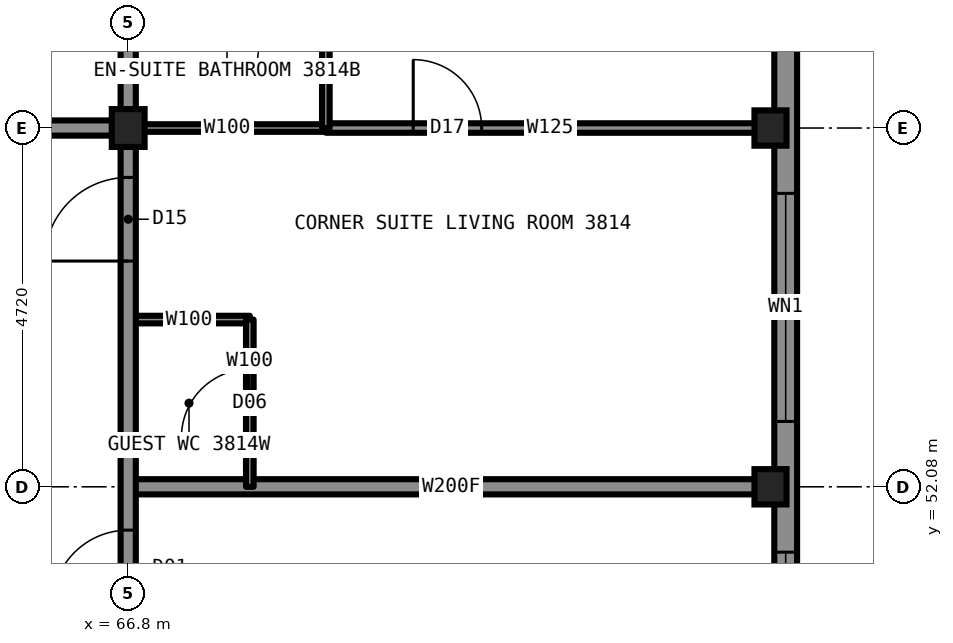
"""IFC4 building model, lengths in metres.
Left out: names, types, materials, properties, quantities, classifications, styles, units other than length and angle.
Written with IfcOpenShell. Run it as: python <this file> out.ifc"""

import sys

from ifc_helpers import new_model, si_unit, direction, frame, frame_2d, origin, origin_2d, place, context, subcontext, project, spatial, rectangle, i_section, extrude, element, fill, save


model = new_model("IFC4")
c1 = context("Model", 3, precision=1e-05, world=origin(), true_north=direction((0.0, 1.0)))
c2 = subcontext(c1, "Body", "Model", "MODEL_VIEW")
j1 = project(units=[si_unit("LENGTHUNIT", "METRE"), si_unit("PLANEANGLEUNIT", "RADIAN")], contexts=[c1])
p1 = place(None, origin())
s1 = spatial("IfcSite", under=j1, at=p1, CompositionType="ELEMENT")
p2 = place(p1, origin())
s2 = spatial("IfcBuilding", under=s1, at=p2, CompositionType="ELEMENT")
p3 = place(p2, frame((0.0, 0.0, 135.4)))
s3 = spatial("IfcBuildingStorey", under=s2, at=p3, CompositionType="ELEMENT", Elevation=135.4)
for number, where, z_axis, x_axis in (
    (1, (75.25, 52.08, 0.0), (0.0, 0.0, 1.0), (1.0, 0.0, 0.0)),
    (2, (75.25, 56.8, 0.0), (0.0, 0.0, 1.0), (1.0, 0.0, 0.0)),
):
    element("IfcColumn", number, at=place(p3, frame(where, z_axis=z_axis, x_axis=x_axis)), inside=s3, PredefinedType="COLUMN", context=c2, shape_type="SweptSolid", body=[
        extrude(i_section(OverallWidth=0.422, OverallDepth=0.465, WebThickness=0.045, FlangeThickness=0.073, at=origin_2d()), origin(), (0.0, 0.0, 1.0), 3.5),
    ])
p4 = place(p3, frame((66.8, 56.8, 0.0), z_axis=(0.0, 0.0, 1.0), x_axis=(1.0, 0.0, 0.0)))
e3 = element("IfcColumn", 3, at=p4, inside=s3, PredefinedType="COLUMN", context=c2, shape_type="SweptSolid", body=[
    extrude(i_section(OverallWidth=0.432, OverallDepth=0.498, WebThickness=0.056, FlangeThickness=0.089, at=origin_2d()), origin(), (0.0, 0.0, 1.0), 3.5),
])
p5 = place(p3, frame((66.8, 56.8, 0.0), z_axis=(0.0, 0.0, 1.0), x_axis=(1.0, 0.0, 0.0)))
e4 = element("IfcWall", 4, at=p5, inside=s3, PredefinedType="PARTITIONING", context=c2, shape_type="SweptSolid", body=[
    extrude(rectangle(XDim=2.6, YDim=0.1, at=frame_2d((1.3, 0.0))), origin(), (0.0, 0.0, 1.0), 2.573),
])
p6 = place(p3, frame((43.2, 56.8, 0.0), z_axis=(0.0, 0.0, 1.0), x_axis=(1.0, 0.0, 0.0)))
e5 = element("IfcWall", 5, at=p6, inside=s3, PredefinedType="PARTITIONING", context=c2, shape_type="SweptSolid", body=[
    extrude(rectangle(XDim=23.6, YDim=0.2, at=frame_2d((11.8, 0.0))), origin(), (0.0, 0.0, 1.0), 3.33),
])
p7 = place(p6, frame((1.85, 0.0, 0.0)))
e6 = element("IfcOpeningElement", 6, at=p7, cuts=e5, PredefinedType="OPENING", context=c2, shape_type="SweptSolid", body=[
    extrude(rectangle(XDim=1.1, YDim=2.2, at=frame_2d((0.55, 1.1))), frame((0.0, 0.11, 0.0), z_axis=(0.0, -1.0, 0.0), x_axis=(1.0, 0.0, 0.0)), (0.0, 0.0, 1.0), 0.22),
])
p8 = place(p6, frame((14.56, 0.0, 0.0)))
e7 = element("IfcOpeningElement", 7, at=p8, cuts=e5, PredefinedType="OPENING", context=c2, shape_type="SweptSolid", body=[
    extrude(rectangle(XDim=1.0, YDim=2.2, at=frame_2d((0.5, 1.1))), frame((0.0, 0.11, 0.0), z_axis=(0.0, -1.0, 0.0), x_axis=(1.0, 0.0, 0.0)), (0.0, 0.0, 1.0), 0.22),
])
p9 = place(p6, frame((21.14, 0.0, 0.0)))
e8 = element("IfcOpeningElement", 8, at=p9, cuts=e5, PredefinedType="OPENING", context=c2, shape_type="SweptSolid", body=[
    extrude(rectangle(XDim=1.0, YDim=2.2, at=frame_2d((0.5, 1.1))), frame((0.0, 0.11, 0.0), z_axis=(0.0, -1.0, 0.0), x_axis=(1.0, 0.0, 0.0)), (0.0, 0.0, 1.0), 0.22),
])
p10 = place(p3, frame((69.4, 56.8, 0.0), z_axis=(0.0, 0.0, 1.0), x_axis=(1.0, 0.0, 0.0)))
e9 = element("IfcWall", 9, at=p10, inside=s3, PredefinedType="PARTITIONING", context=c2, shape_type="SweptSolid", body=[
    extrude(rectangle(XDim=5.9, YDim=0.125, at=frame_2d((2.95, 0.0))), origin(), (0.0, 0.0, 1.0), 2.573),
])
p11 = place(p10, frame((1.15, 0.0, 0.0)))
e10 = element("IfcOpeningElement", 10, at=p11, cuts=e9, PredefinedType="OPENING", context=c2, shape_type="SweptSolid", body=[
    extrude(rectangle(XDim=0.9, YDim=2.2, at=frame_2d((0.45, 1.1))), frame((0.0, 0.073, 0.0), z_axis=(0.0, -1.0, 0.0), x_axis=(1.0, 0.0, 0.0)), (0.0, 0.0, 1.0), 0.145),
])
p12 = place(p3, frame((66.8, 52.08, 0.0), z_axis=(0.0, 0.0, 1.0), x_axis=(1.0, 0.0, 0.0)))
e11 = element("IfcWall", 11, at=p12, inside=s3, PredefinedType="PARTITIONING", context=c2, shape_type="SweptSolid", body=[
    extrude(rectangle(XDim=8.5, YDim=0.2, at=frame_2d((4.25, 0.0))), origin(), (0.0, 0.0, 1.0), 2.573),
])
p13 = place(p3, frame((66.8, 54.28, 0.0), z_axis=(0.0, 0.0, 1.0), x_axis=(1.0, 0.0, 0.0)))
e12 = element("IfcWall", 12, at=p13, inside=s3, PredefinedType="PARTITIONING", context=c2, shape_type="SweptSolid", body=[
    extrude(rectangle(XDim=1.6, YDim=0.1, at=frame_2d((0.8, 0.0))), origin(), (0.0, 0.0, 1.0), 3.33),
])
p14 = place(p3, frame((66.8, 33.2, 0.0), z_axis=(0.0, 0.0, 1.0), x_axis=(0.0, 1.0, 0.0)))
e13 = element("IfcWall", 13, at=p14, inside=s3, PredefinedType="PARTITIONING", context=c2, shape_type="SweptSolid", body=[
    extrude(rectangle(XDim=23.6, YDim=0.2, at=frame_2d((11.8, 0.0))), origin(), (0.0, 0.0, 1.0), 3.33),
])
p15 = place(p14, frame((7.27, 0.0, 0.0)))
e14 = element("IfcOpeningElement", 14, at=p15, cuts=e13, PredefinedType="OPENING", context=c2, shape_type="SweptSolid", body=[
    extrude(rectangle(XDim=1.0, YDim=2.2, at=frame_2d((0.5, 1.1))), frame((0.0, 0.11, 0.0), z_axis=(0.0, -1.0, 0.0), x_axis=(1.0, 0.0, 0.0)), (0.0, 0.0, 1.0), 0.22),
])
p16 = place(p14, frame((11.99, 0.0, 0.0)))
e15 = element("IfcOpeningElement", 15, at=p16, cuts=e13, PredefinedType="OPENING", context=c2, shape_type="SweptSolid", body=[
    extrude(rectangle(XDim=1.0, YDim=2.2, at=frame_2d((0.5, 1.1))), frame((0.0, 0.11, 0.0), z_axis=(0.0, -1.0, 0.0), x_axis=(1.0, 0.0, 0.0)), (0.0, 0.0, 1.0), 0.22),
])
p17 = place(p14, frame((17.31, 0.0, 0.0)))
e16 = element("IfcOpeningElement", 16, at=p17, cuts=e13, PredefinedType="OPENING", context=c2, shape_type="SweptSolid", body=[
    extrude(rectangle(XDim=1.0, YDim=2.2, at=frame_2d((0.5, 1.1))), frame((0.0, 0.11, 0.0), z_axis=(0.0, -1.0, 0.0), x_axis=(1.0, 0.0, 0.0)), (0.0, 0.0, 1.0), 0.22),
])
p18 = place(p14, frame((21.85, 0.0, 0.0)))
e17 = element("IfcOpeningElement", 17, at=p18, cuts=e13, PredefinedType="OPENING", context=c2, shape_type="SweptSolid", body=[
    extrude(rectangle(XDim=1.1, YDim=2.2, at=frame_2d((0.55, 1.1))), frame((0.0, 0.11, 0.0), z_axis=(0.0, -1.0, 0.0), x_axis=(1.0, 0.0, 0.0)), (0.0, 0.0, 1.0), 0.22),
])
p19 = place(p14, frame((0.65, 0.0, 0.0)))
e18 = element("IfcOpeningElement", 18, at=p19, cuts=e13, PredefinedType="OPENING", context=c2, shape_type="SweptSolid", body=[
    extrude(rectangle(XDim=1.1, YDim=2.2, at=frame_2d((0.55, 1.1))), frame((0.0, 0.11, 0.0), z_axis=(0.0, -1.0, 0.0), x_axis=(1.0, 0.0, 0.0)), (0.0, 0.0, 1.0), 0.22),
])
p20 = place(p3, frame((66.8, 56.8, 0.0), z_axis=(0.0, 0.0, 1.0), x_axis=(0.0, 1.0, 0.0)))
e19 = element("IfcWall", 19, at=p20, inside=s3, PredefinedType="PARTITIONING", context=c2, shape_type="SweptSolid", body=[
    extrude(rectangle(XDim=8.5, YDim=0.2, at=frame_2d((4.25, 0.0))), origin(), (0.0, 0.0, 1.0), 2.573),
])
p21 = place(p3, frame((68.4, 52.08, 0.0), z_axis=(0.0, 0.0, 1.0), x_axis=(0.0, 1.0, 0.0)))
e20 = element("IfcWall", 20, at=p21, inside=s3, PredefinedType="PARTITIONING", context=c2, shape_type="SweptSolid", body=[
    extrude(rectangle(XDim=2.2, YDim=0.1, at=frame_2d((1.1, 0.0))), origin(), (0.0, 0.0, 1.0), 3.33),
])
p22 = place(p21, frame((0.65, 0.0, 0.0)))
e21 = element("IfcOpeningElement", 21, at=p22, cuts=e20, PredefinedType="OPENING", context=c2, shape_type="SweptSolid", body=[
    extrude(rectangle(XDim=0.9, YDim=2.1, at=frame_2d((0.45, 1.05))), frame((0.0, 0.06, 0.0), z_axis=(0.0, -1.0, 0.0), x_axis=(1.0, 0.0, 0.0)), (0.0, 0.0, 1.0), 0.12),
])
p23 = place(p3, frame((69.4, 56.8, 0.0), z_axis=(0.0, 0.0, 1.0), x_axis=(0.0, 1.0, 0.0)))
e22 = element("IfcWall", 22, at=p23, inside=s3, PredefinedType="PARTITIONING", context=c2, shape_type="SweptSolid", body=[
    extrude(rectangle(XDim=2.6, YDim=0.1, at=frame_2d((1.3, 0.0))), origin(), (0.0, 0.0, 1.0), 3.33),
])
p24 = place(p23, frame((0.85, 0.0, 0.0)))
e23 = element("IfcOpeningElement", 23, at=p24, cuts=e22, PredefinedType="OPENING", context=c2, shape_type="SweptSolid", body=[
    extrude(rectangle(XDim=0.9, YDim=2.1, at=frame_2d((0.45, 1.05))), frame((0.0, 0.06, 0.0), z_axis=(0.0, -1.0, 0.0), x_axis=(1.0, 0.0, 0.0)), (0.0, 0.0, 1.0), 0.12),
])
p25 = place(p3, frame((75.45, 29.9, 0.0), z_axis=(0.0, 0.0, 1.0), x_axis=(0.0, 1.0, 0.0)))
e24 = element("IfcWall", 24, at=p25, inside=s3, PredefinedType="SOLIDWALL", context=c2, shape_type="SweptSolid", body=[
    extrude(rectangle(XDim=30.2, YDim=0.3, at=frame_2d((15.1, 0.0))), origin(), (0.0, 0.0, 1.0), 2.83),
])
p26 = place(p25, frame((0.85, 0.0, 0.5)))
e25 = element("IfcOpeningElement", 25, at=p26, cuts=e24, PredefinedType="OPENING", context=c2, shape_type="SweptSolid", body=[
    extrude(rectangle(XDim=1.6, YDim=2.0, at=frame_2d((0.8, 1.0))), frame((0.0, 0.16, 0.0), z_axis=(0.0, -1.0, 0.0), x_axis=(1.0, 0.0, 0.0)), (0.0, 0.0, 1.0), 0.32),
])
p27 = place(p25, frame((4.16, 0.0, 0.5)))
e26 = element("IfcOpeningElement", 26, at=p27, cuts=e24, PredefinedType="OPENING", context=c2, shape_type="SweptSolid", body=[
    extrude(rectangle(XDim=1.3, YDim=1.9, at=frame_2d((0.65, 0.95))), frame((0.0, 0.16, 0.0), z_axis=(0.0, -1.0, 0.0), x_axis=(1.0, 0.0, 0.0)), (0.0, 0.0, 1.0), 0.32),
])
p28 = place(p25, frame((8.88, 0.0, 0.5)))
e27 = element("IfcOpeningElement", 27, at=p28, cuts=e24, PredefinedType="OPENING", context=c2, shape_type="SweptSolid", body=[
    extrude(rectangle(XDim=3.0, YDim=2.0, at=frame_2d((1.5, 1.0))), frame((0.0, 0.16, 0.0), z_axis=(0.0, -1.0, 0.0), x_axis=(1.0, 0.0, 0.0)), (0.0, 0.0, 1.0), 0.32),
])
p29 = place(p25, frame((13.6, 0.0, 0.5)))
e28 = element("IfcOpeningElement", 28, at=p29, cuts=e24, PredefinedType="OPENING", context=c2, shape_type="SweptSolid", body=[
    extrude(rectangle(XDim=3.0, YDim=2.0, at=frame_2d((1.5, 1.0))), frame((0.0, 0.16, 0.0), z_axis=(0.0, -1.0, 0.0), x_axis=(1.0, 0.0, 0.0)), (0.0, 0.0, 1.0), 0.32),
])
p30 = place(p25, frame((18.32, 0.0, 0.5)))
e29 = element("IfcOpeningElement", 29, at=p30, cuts=e24, PredefinedType="OPENING", context=c2, shape_type="SweptSolid", body=[
    extrude(rectangle(XDim=3.0, YDim=2.0, at=frame_2d((1.5, 1.0))), frame((0.0, 0.16, 0.0), z_axis=(0.0, -1.0, 0.0), x_axis=(1.0, 0.0, 0.0)), (0.0, 0.0, 1.0), 0.32),
])
p31 = place(p25, frame((24.69, 0.0, 0.5)))
e30 = element("IfcOpeningElement", 30, at=p31, cuts=e24, PredefinedType="OPENING", context=c2, shape_type="SweptSolid", body=[
    extrude(rectangle(XDim=1.3, YDim=1.9, at=frame_2d((0.65, 0.95))), frame((0.0, 0.16, 0.0), z_axis=(0.0, -1.0, 0.0), x_axis=(1.0, 0.0, 0.0)), (0.0, 0.0, 1.0), 0.32),
])
p32 = place(p25, frame((27.75, 0.0, 0.5)))
e31 = element("IfcOpeningElement", 31, at=p32, cuts=e24, PredefinedType="OPENING", context=c2, shape_type="SweptSolid", body=[
    extrude(rectangle(XDim=1.6, YDim=2.0, at=frame_2d((0.8, 1.0))), frame((0.0, 0.16, 0.0), z_axis=(0.0, -1.0, 0.0), x_axis=(1.0, 0.0, 0.0)), (0.0, 0.0, 1.0), 0.32),
])
p33 = place(p25, frame((5.51, 0.0, 0.5)))
e32 = element("IfcOpeningElement", 32, at=p33, cuts=e24, PredefinedType="OPENING", context=c2, shape_type="SweptSolid", body=[
    extrude(rectangle(XDim=0.7, YDim=0.9, at=frame_2d((0.35, 0.45))), frame((0.0, 0.16, 0.0), z_axis=(0.0, -1.0, 0.0), x_axis=(1.0, 0.0, 0.0)), (0.0, 0.0, 1.0), 0.32),
])
p34 = place(p25, frame((23.99, 0.0, 0.5)))
e33 = element("IfcOpeningElement", 33, at=p34, cuts=e24, PredefinedType="OPENING", context=c2, shape_type="SweptSolid", body=[
    extrude(rectangle(XDim=0.7, YDim=0.9, at=frame_2d((0.35, 0.45))), frame((0.0, 0.16, 0.0), z_axis=(0.0, -1.0, 0.0), x_axis=(1.0, 0.0, 0.0)), (0.0, 0.0, 1.0), 0.32),
])
p35 = place(p17, origin())
e34 = element("IfcDoor", 34, at=p35, inside=s3, OperationType="SINGLE_SWING_LEFT", PredefinedType="DOOR", context=c2, shape_type="SweptSolid", body=[
    extrude(rectangle(XDim=1.0, YDim=2.2, at=frame_2d((0.5, 1.1))), frame((0.0, 0.025, 0.0), z_axis=(0.0, -1.0, 0.0), x_axis=(1.0, 0.0, 0.0)), (0.0, 0.0, 1.0), 0.05),
])
fill(e16, e34)
p36 = place(p18, origin())
e35 = element("IfcDoor", 35, at=p36, inside=s3, OperationType="SINGLE_SWING_LEFT", PredefinedType="DOOR", context=c2, shape_type="SweptSolid", body=[
    extrude(rectangle(XDim=1.1, YDim=2.2, at=frame_2d((0.55, 1.1))), frame((0.0, 0.025, 0.0), z_axis=(0.0, -1.0, 0.0), x_axis=(1.0, 0.0, 0.0)), (0.0, 0.0, 1.0), 0.05),
])
fill(e17, e35)
p37 = place(p24, origin())
e36 = element("IfcDoor", 36, at=p37, inside=s3, OperationType="SINGLE_SWING_RIGHT", PredefinedType="DOOR", context=c2, shape_type="SweptSolid", body=[
    extrude(rectangle(XDim=0.9, YDim=2.1, at=frame_2d((0.45, 1.05))), frame((0.0, 0.025, 0.0), z_axis=(0.0, -1.0, 0.0), x_axis=(1.0, 0.0, 0.0)), (0.0, 0.0, 1.0), 0.05),
])
fill(e23, e36)
p38 = place(p11, origin())
e37 = element("IfcDoor", 37, at=p38, inside=s3, OperationType="SINGLE_SWING_LEFT", PredefinedType="DOOR", context=c2, shape_type="SweptSolid", body=[
    extrude(rectangle(XDim=0.9, YDim=2.2, at=frame_2d((0.45, 1.1))), frame((0.0, 0.025, 0.0), z_axis=(0.0, -1.0, 0.0), x_axis=(1.0, 0.0, 0.0)), (0.0, 0.0, 1.0), 0.05),
])
fill(e10, e37)
p39 = place(p22, origin())
e38 = element("IfcDoor", 38, at=p39, inside=s3, OperationType="SINGLE_SWING_LEFT", PredefinedType="DOOR", context=c2, shape_type="SweptSolid", body=[
    extrude(rectangle(XDim=0.9, YDim=2.1, at=frame_2d((0.45, 1.05))), frame((0.0, 0.025, 0.0), z_axis=(0.0, -1.0, 0.0), x_axis=(1.0, 0.0, 0.0)), (0.0, 0.0, 1.0), 0.05),
])
fill(e21, e38)
p40 = place(p30, origin())
e39 = element("IfcWindow", 39, at=p40, inside=s3, PartitioningType="SINGLE_PANEL", PredefinedType="WINDOW", context=c2, shape_type="SweptSolid", body=[
    extrude(rectangle(XDim=3.0, YDim=2.0, at=frame_2d((1.5, 1.0))), frame((0.0, 0.03, 0.0), z_axis=(0.0, -1.0, 0.0), x_axis=(1.0, 0.0, 0.0)), (0.0, 0.0, 1.0), 0.06),
])
fill(e29, e39)
p41 = place(p31, origin())
e40 = element("IfcWindow", 40, at=p41, inside=s3, PartitioningType="SINGLE_PANEL", PredefinedType="WINDOW", context=c2, shape_type="SweptSolid", body=[
    extrude(rectangle(XDim=1.3, YDim=1.9, at=frame_2d((0.65, 0.95))), frame((0.0, 0.03, 0.0), z_axis=(0.0, -1.0, 0.0), x_axis=(1.0, 0.0, 0.0)), (0.0, 0.0, 1.0), 0.06),
])
fill(e30, e40)
p42 = place(p32, origin())
e41 = element("IfcWindow", 41, at=p42, inside=s3, PartitioningType="SINGLE_PANEL", PredefinedType="WINDOW", context=c2, shape_type="SweptSolid", body=[
    extrude(rectangle(XDim=1.6, YDim=2.0, at=frame_2d((0.8, 1.0))), frame((0.0, 0.03, 0.0), z_axis=(0.0, -1.0, 0.0), x_axis=(1.0, 0.0, 0.0)), (0.0, 0.0, 1.0), 0.06),
])
fill(e31, e41)
p43 = place(p34, origin())
e42 = element("IfcWindow", 42, at=p43, inside=s3, PartitioningType="SINGLE_PANEL", PredefinedType="WINDOW", context=c2, shape_type="SweptSolid", body=[
    extrude(rectangle(XDim=0.7, YDim=0.9, at=frame_2d((0.35, 0.45))), frame((0.0, 0.03, 0.0), z_axis=(0.0, -1.0, 0.0), x_axis=(1.0, 0.0, 0.0)), (0.0, 0.0, 1.0), 0.06),
])
fill(e33, e42)
save(model, sys.argv[1])
